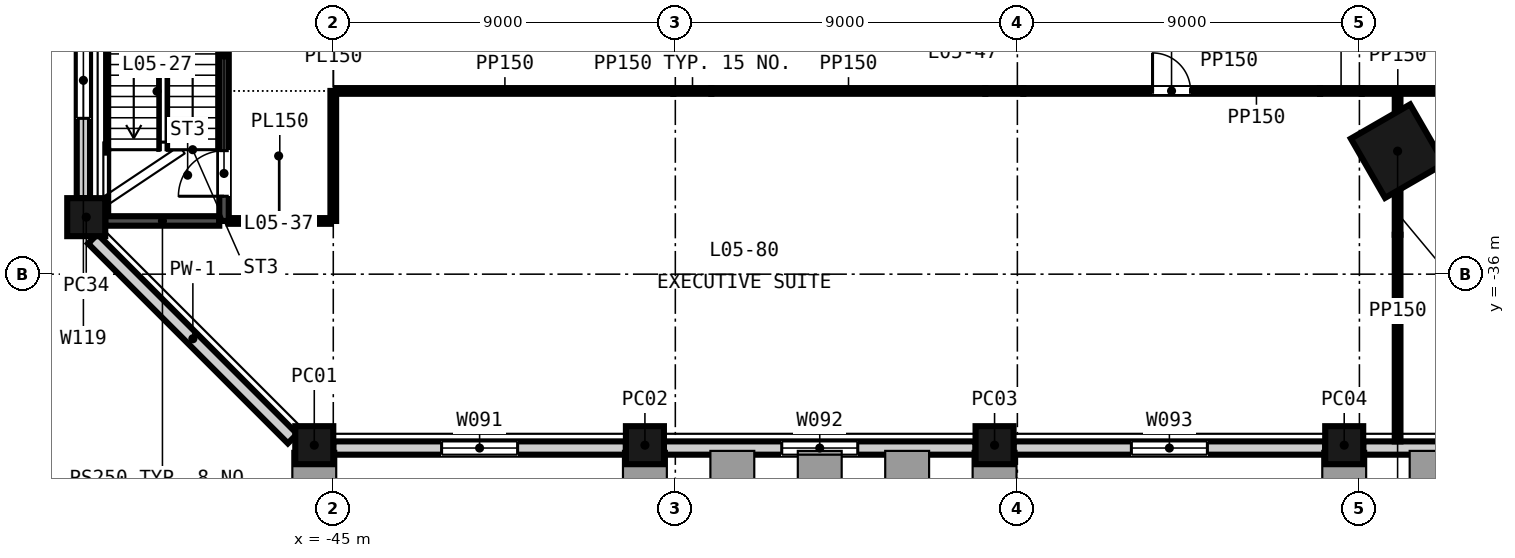
"""IFC4 building model, lengths in metres.
Left out: names, types, materials, properties, quantities, classifications, styles, units other than length and angle.
Written with IfcOpenShell. Run it as: python <this file> out.ifc"""

import sys

from ifc_helpers import new_model, si_unit, direction, frame, frame_2d, origin, origin_2d, place, context, subcontext, project, spatial, rectangle, extrude, element, fill, save


model = new_model("IFC4")
c1 = context("Model", 3, precision=1e-05, world=origin(), true_north=direction((0.0, 1.0)))
c2 = subcontext(c1, "Body", "Model", "MODEL_VIEW")
j1 = project(units=[si_unit("LENGTHUNIT", "METRE"), si_unit("PLANEANGLEUNIT", "RADIAN")], contexts=[c1])
p1 = place(None, origin())
s1 = spatial("IfcSite", under=j1, at=p1, CompositionType="ELEMENT")
p2 = place(p1, origin())
s2 = spatial("IfcBuilding", under=s1, at=p2, CompositionType="ELEMENT")
p3 = place(p2, frame((0.0, 0.0, 31.5)))
s3 = spatial("IfcBuildingStorey", under=s2, at=p3, CompositionType="ELEMENT", Elevation=31.5)
p4 = place(p3, frame((-16.995, -32.763, -0.3), z_axis=(0.0, 0.0, 1.0), x_axis=(0.5, -0.866025403784, 0.0)))
e1 = element("IfcColumn", 1, at=p4, inside=s3, PredefinedType="COLUMN", context=c2, shape_type="SweptSolid", body=[
    extrude(rectangle(XDim=1.8, YDim=1.8, at=origin_2d()), origin(), (0.0, 0.0, 1.0), 4.65),
])
for number, where, z_axis, x_axis in (
    (2, (-45.5, -40.5, -0.3), (0.0, 0.0, 1.0), (1.0, 0.0, 0.0)),
    (3, (-36.8, -40.5, -0.3), (0.0, 0.0, 1.0), (1.0, 0.0, 0.0)),
    (4, (-27.6, -40.5, -0.3), (0.0, 0.0, 1.0), (1.0, 0.0, 0.0)),
    (5, (-18.4, -40.5, -0.3), (0.0, 0.0, 1.0), (1.0, 0.0, 0.0)),
    (6, (-51.5, -34.5, -0.3), (0.0, 0.0, 1.0), (0.0, -1.0, 0.0)),
):
    element("IfcColumn", number, at=place(p3, frame(where, z_axis=z_axis, x_axis=x_axis)), inside=s3, PredefinedType="COLUMN", context=c2, shape_type="SweptSolid", body=[
        extrude(rectangle(XDim=1.0, YDim=1.0, at=origin_2d()), origin(), (0.0, 0.0, 1.0), 4.65),
    ])
p5 = place(p3, frame((-45.0, -40.575, -0.3), z_axis=(0.0, 0.0, 1.0), x_axis=(1.0, 0.0, 0.0)))
e7 = element("IfcWall", 7, at=p5, inside=s3, PredefinedType="SOLIDWALL", context=c2, shape_type="SweptSolid", body=[
    extrude(rectangle(XDim=7.7, YDim=0.35, at=frame_2d((3.85, 0.0))), origin(), (0.0, 0.0, 1.0), 3.75),
])
p6 = place(p5, frame((2.85, 0.0, 1.2)))
e8 = element("IfcOpeningElement", 8, at=p6, cuts=e7, PredefinedType="OPENING", context=c2, shape_type="SweptSolid", body=[
    extrude(rectangle(XDim=2.0, YDim=2.5, at=frame_2d((1.0, 1.25))), frame((0.0, 0.185, 0.0), z_axis=(0.0, -1.0, 0.0), x_axis=(1.0, 0.0, 0.0)), (0.0, 0.0, 1.0), 0.37),
])
p7 = place(p3, frame((-36.3, -40.575, -0.3), z_axis=(0.0, 0.0, 1.0), x_axis=(1.0, 0.0, 0.0)))
e9 = element("IfcWall", 9, at=p7, inside=s3, PredefinedType="SOLIDWALL", context=c2, shape_type="SweptSolid", body=[
    extrude(rectangle(XDim=8.2, YDim=0.35, at=frame_2d((4.1, 0.0))), origin(), (0.0, 0.0, 1.0), 3.75),
])
p8 = place(p7, frame((3.1, 0.0, 1.2)))
e10 = element("IfcOpeningElement", 10, at=p8, cuts=e9, PredefinedType="OPENING", context=c2, shape_type="SweptSolid", body=[
    extrude(rectangle(XDim=2.0, YDim=2.5, at=frame_2d((1.0, 1.25))), frame((0.0, 0.185, 0.0), z_axis=(0.0, -1.0, 0.0), x_axis=(1.0, 0.0, 0.0)), (0.0, 0.0, 1.0), 0.37),
])
p9 = place(p3, frame((-27.1, -40.575, -0.3), z_axis=(0.0, 0.0, 1.0), x_axis=(1.0, 0.0, 0.0)))
e11 = element("IfcWall", 11, at=p9, inside=s3, PredefinedType="SOLIDWALL", context=c2, shape_type="SweptSolid", body=[
    extrude(rectangle(XDim=8.2, YDim=0.35, at=frame_2d((4.1, 0.0))), origin(), (0.0, 0.0, 1.0), 3.75),
])
p10 = place(p9, frame((3.1, 0.0, 1.2)))
e12 = element("IfcOpeningElement", 12, at=p10, cuts=e11, PredefinedType="OPENING", context=c2, shape_type="SweptSolid", body=[
    extrude(rectangle(XDim=2.0, YDim=2.5, at=frame_2d((1.0, 1.25))), frame((0.0, 0.185, 0.0), z_axis=(0.0, -1.0, 0.0), x_axis=(1.0, 0.0, 0.0)), (0.0, 0.0, 1.0), 0.37),
])
p11 = place(p3, frame((-17.9, -40.575, -0.3), z_axis=(0.0, 0.0, 1.0), x_axis=(1.0, 0.0, 0.0)))
e13 = element("IfcWall", 13, at=p11, inside=s3, PredefinedType="SOLIDWALL", context=c2, shape_type="SweptSolid", body=[
    extrude(rectangle(XDim=8.2, YDim=0.35, at=frame_2d((4.1, 0.0))), origin(), (0.0, 0.0, 1.0), 3.75),
])
p12 = place(p11, frame((3.1, 0.0, 1.2)))
e14 = element("IfcOpeningElement", 14, at=p12, cuts=e13, PredefinedType="OPENING", context=c2, shape_type="SweptSolid", body=[
    extrude(rectangle(XDim=2.0, YDim=2.5, at=frame_2d((1.0, 1.25))), frame((0.0, 0.185, 0.0), z_axis=(0.0, -1.0, 0.0), x_axis=(1.0, 0.0, 0.0)), (0.0, 0.0, 1.0), 0.37),
])
p13 = place(p3, frame((-51.575, -27.8, -0.3), z_axis=(0.0, 0.0, 1.0), x_axis=(0.0, -1.0, 0.0)))
e15 = element("IfcWall", 15, at=p13, inside=s3, PredefinedType="SOLIDWALL", context=c2, shape_type="SweptSolid", body=[
    extrude(rectangle(XDim=6.2, YDim=0.35, at=frame_2d((3.1, 0.0))), origin(), (0.0, 0.0, 1.0), 3.75),
])
p14 = place(p13, frame((2.1, 0.0, 1.2)))
e16 = element("IfcOpeningElement", 16, at=p14, cuts=e15, PredefinedType="OPENING", context=c2, shape_type="SweptSolid", body=[
    extrude(rectangle(XDim=2.0, YDim=2.5, at=frame_2d((1.0, 1.25))), frame((0.0, 0.185, 0.0), z_axis=(0.0, -1.0, 0.0), x_axis=(1.0, 0.0, 0.0)), (0.0, 0.0, 1.0), 0.37),
])
p15 = place(p3, frame((-51.327, -35.072, -0.3), z_axis=(0.0, 0.0, 1.0), x_axis=(0.707106781187, -0.707106781187, 0.0)))
e17 = element("IfcWall", 17, at=p15, inside=s3, PredefinedType="SOLIDWALL", context=c2, shape_type="SweptSolid", body=[
    extrude(rectangle(XDim=7.433, YDim=0.35, at=frame_2d((3.716, 0.0))), origin(), (0.0, 0.0, 1.0), 3.75),
])
p16 = place(p3, frame((-51.0, -34.6, 0.0), z_axis=(0.0, 0.0, 1.0), x_axis=(1.0, 0.0, 0.0)))
e18 = element("IfcWall", 18, at=p16, inside=s3, PredefinedType="SHEAR", context=c2, shape_type="SweptSolid", body=[
    extrude(rectangle(XDim=3.0, YDim=0.25, at=frame_2d((1.5, 0.0))), origin(), (0.0, 0.0, 1.0), 4.35),
])
p17 = place(p3, frame((-47.75, -34.6, 0.0), z_axis=(0.0, 0.0, 1.0), x_axis=(1.0, 0.0, 0.0)))
e19 = element("IfcWall", 19, at=p17, inside=s3, PredefinedType="PARTITIONING", context=c2, shape_type="SweptSolid", body=[
    extrude(rectangle(XDim=2.675, YDim=0.15, at=frame_2d((1.337, 0.0))), origin(), (0.0, 0.0, 1.0), 4.35),
])
p18 = place(p3, frame((-44.925, -31.179, 0.0), z_axis=(0.0, 0.0, 1.0), x_axis=(1.0, 0.0, 0.0)))
e20 = element("IfcWall", 20, at=p18, inside=s3, PredefinedType="PARTITIONING", context=c2, shape_type="SweptSolid", body=[
    extrude(rectangle(XDim=8.872, YDim=0.15, at=frame_2d((4.436, 0.0))), origin(), (0.0, 0.0, 1.0), 4.35),
])
p19 = place(p3, frame((-36.053, -31.179, 0.0), z_axis=(0.0, 0.0, 1.0), x_axis=(1.0, 0.0, 0.0)))
e21 = element("IfcWall", 21, at=p19, inside=s3, PredefinedType="PARTITIONING", context=c2, shape_type="SweptSolid", body=[
    extrude(rectangle(XDim=1.0, YDim=0.15, at=frame_2d((0.5, 0.0))), origin(), (0.0, 0.0, 1.0), 3.261),
])
p20 = place(p3, frame((-35.053, -31.179, 0.0), z_axis=(0.0, 0.0, 1.0), x_axis=(1.0, 0.0, 0.0)))
e22 = element("IfcWall", 22, at=p20, inside=s3, PredefinedType="PARTITIONING", context=c2, shape_type="SweptSolid", body=[
    extrude(rectangle(XDim=7.209, YDim=0.15, at=frame_2d((3.605, 0.0))), origin(), (0.0, 0.0, 1.0), 4.35),
])
p21 = place(p3, frame((-27.843, -31.179, 0.0), z_axis=(0.0, 0.0, 1.0), x_axis=(1.0, 0.0, 0.0)))
e23 = element("IfcWall", 23, at=p21, inside=s3, PredefinedType="PARTITIONING", context=c2, shape_type="SweptSolid", body=[
    extrude(rectangle(XDim=1.0, YDim=0.15, at=frame_2d((0.5, 0.0))), origin(), (0.0, 0.0, 1.0), 3.436),
])
p22 = place(p3, frame((-26.843, -31.179, 0.0), z_axis=(0.0, 0.0, 1.0), x_axis=(1.0, 0.0, 0.0)))
e24 = element("IfcWall", 24, at=p22, inside=s3, PredefinedType="PARTITIONING", context=c2, shape_type="SweptSolid", body=[
    extrude(rectangle(XDim=7.807, YDim=0.15, at=frame_2d((3.904, 0.0))), origin(), (0.0, 0.0, 1.0), 4.35),
])
p23 = place(p22, frame((3.4, 0.0, 0.0)))
e25 = element("IfcOpeningElement", 25, at=p23, cuts=e24, PredefinedType="OPENING", context=c2, shape_type="SweptSolid", body=[
    extrude(rectangle(XDim=1.0, YDim=2.1, at=frame_2d((0.5, 1.05))), frame((0.0, 0.085, 0.0), z_axis=(0.0, -1.0, 0.0), x_axis=(1.0, 0.0, 0.0)), (0.0, 0.0, 1.0), 0.17),
])
p24 = place(p3, frame((-19.036, -31.179, 0.0), z_axis=(0.0, 0.0, 1.0), x_axis=(1.0, 0.0, 0.0)))
e26 = element("IfcWall", 26, at=p24, inside=s3, PredefinedType="PARTITIONING", context=c2, shape_type="SweptSolid", body=[
    extrude(rectangle(XDim=1.097, YDim=0.15, at=frame_2d((0.548, 0.0))), origin(), (0.0, 0.0, 1.0), 3.5),
])
p25 = place(p3, frame((-17.939, -31.179, 0.0), z_axis=(0.0, 0.0, 1.0), x_axis=(1.0, 0.0, 0.0)))
e27 = element("IfcWall", 27, at=p25, inside=s3, PredefinedType="PARTITIONING", context=c2, shape_type="SweptSolid", body=[
    extrude(rectangle(XDim=17.593, YDim=0.15, at=frame_2d((8.796, 0.0))), origin(), (0.0, 0.0, 1.0), 4.35),
])
p26 = place(p25, frame((2.094, 0.0, 0.0)))
e28 = element("IfcOpeningElement", 28, at=p26, cuts=e27, PredefinedType="OPENING", context=c2, shape_type="SweptSolid", body=[
    extrude(rectangle(XDim=1.0, YDim=2.1, at=frame_2d((0.5, 1.05))), frame((0.0, 0.085, 0.0), z_axis=(0.0, -1.0, 0.0), x_axis=(1.0, 0.0, 0.0)), (0.0, 0.0, 1.0), 0.17),
])
p27 = place(p25, frame((5.957, 0.0, 0.0)))
e29 = element("IfcOpeningElement", 29, at=p27, cuts=e27, PredefinedType="OPENING", context=c2, shape_type="SweptSolid", body=[
    extrude(rectangle(XDim=1.0, YDim=2.1, at=frame_2d((0.5, 1.05))), frame((0.0, 0.085, 0.0), z_axis=(0.0, -1.0, 0.0), x_axis=(1.0, 0.0, 0.0)), (0.0, 0.0, 1.0), 0.17),
])
p28 = place(p25, frame((13.978, 0.0, 0.0)))
e30 = element("IfcOpeningElement", 30, at=p28, cuts=e27, PredefinedType="OPENING", context=c2, shape_type="SweptSolid", body=[
    extrude(rectangle(XDim=1.0, YDim=2.1, at=frame_2d((0.5, 1.05))), frame((0.0, 0.085, 0.0), z_axis=(0.0, -1.0, 0.0), x_axis=(1.0, 0.0, 0.0)), (0.0, 0.0, 1.0), 0.17),
])
p29 = place(p3, frame((-47.875, -34.6, 0.0), z_axis=(0.0, 0.0, 1.0), x_axis=(0.0, 1.0, 0.0)))
e31 = element("IfcWall", 31, at=p29, inside=s3, PredefinedType="SHEAR", context=c2, shape_type="SweptSolid", body=[
    extrude(rectangle(XDim=6.821, YDim=0.25, at=frame_2d((3.411, 0.0))), origin(), (0.0, 0.0, 1.0), 4.35),
])
p30 = place(p29, frame((0.65, 0.0, 0.0)))
e32 = element("IfcOpeningElement", 32, at=p30, cuts=e31, PredefinedType="OPENING", context=c2, shape_type="SweptSolid", body=[
    extrude(rectangle(XDim=1.2, YDim=2.1, at=frame_2d((0.6, 1.05))), frame((0.0, 0.135, 0.0), z_axis=(0.0, -1.0, 0.0), x_axis=(1.0, 0.0, 0.0)), (0.0, 0.0, 1.0), 0.27),
])
p31 = place(p3, frame((-45.0, -34.6, 0.0), z_axis=(0.0, 0.0, 1.0), x_axis=(0.0, 1.0, 0.0)))
e33 = element("IfcWall", 33, at=p31, inside=s3, PredefinedType="PARTITIONING", context=c2, shape_type="SweptSolid", body=[
    extrude(rectangle(XDim=3.421, YDim=0.15, at=frame_2d((1.71, 0.0))), origin(), (0.0, 0.0, 1.0), 4.35),
])
p32 = place(p3, frame((-16.995, -40.4, 0.0), z_axis=(0.0, 0.0, 1.0), x_axis=(0.0, 1.0, 0.0)))
e34 = element("IfcWall", 34, at=p32, inside=s3, PredefinedType="PARTITIONING", context=c2, shape_type="SweptSolid", body=[
    extrude(rectangle(XDim=5.438, YDim=0.15, at=frame_2d((2.719, 0.0))), origin(), (0.0, 0.0, 1.0), 4.35),
])
p33 = place(p3, frame((-16.995, -34.962, 0.0), z_axis=(0.0, 0.0, 1.0), x_axis=(0.0, 1.0, 0.0)))
e35 = element("IfcWall", 35, at=p33, inside=s3, PredefinedType="PARTITIONING", context=c2, shape_type="SweptSolid", body=[
    extrude(rectangle(XDim=1.117, YDim=0.15, at=frame_2d((0.558, 0.0))), origin(), (0.0, 0.0, 1.0), 3.826),
])
p34 = place(p3, frame((-16.995, -31.681, 0.0), z_axis=(0.0, 0.0, 1.0), x_axis=(0.0, 1.0, 0.0)))
e36 = element("IfcWall", 36, at=p34, inside=s3, PredefinedType="PARTITIONING", context=c2, shape_type="SweptSolid", body=[
    extrude(rectangle(XDim=0.427, YDim=0.15, at=frame_2d((0.213, 0.0))), origin(), (0.0, 0.0, 1.0), 4.35),
])
p35 = place(p6, origin())
e37 = element("IfcWindow", 37, at=p35, inside=s3, PartitioningType="SINGLE_PANEL", PredefinedType="WINDOW", context=c2, shape_type="SweptSolid", body=[
    extrude(rectangle(XDim=2.0, YDim=2.5, at=frame_2d((1.0, 1.25))), frame((0.0, 0.03, 0.0), z_axis=(0.0, -1.0, 0.0), x_axis=(1.0, 0.0, 0.0)), (0.0, 0.0, 1.0), 0.06),
])
fill(e8, e37)
p36 = place(p8, origin())
e38 = element("IfcWindow", 38, at=p36, inside=s3, PartitioningType="SINGLE_PANEL", PredefinedType="WINDOW", context=c2, shape_type="SweptSolid", body=[
    extrude(rectangle(XDim=2.0, YDim=2.5, at=frame_2d((1.0, 1.25))), frame((0.0, 0.03, 0.0), z_axis=(0.0, -1.0, 0.0), x_axis=(1.0, 0.0, 0.0)), (0.0, 0.0, 1.0), 0.06),
])
fill(e10, e38)
p37 = place(p10, origin())
e39 = element("IfcWindow", 39, at=p37, inside=s3, PartitioningType="SINGLE_PANEL", PredefinedType="WINDOW", context=c2, shape_type="SweptSolid", body=[
    extrude(rectangle(XDim=2.0, YDim=2.5, at=frame_2d((1.0, 1.25))), frame((0.0, 0.03, 0.0), z_axis=(0.0, -1.0, 0.0), x_axis=(1.0, 0.0, 0.0)), (0.0, 0.0, 1.0), 0.06),
])
fill(e12, e39)
p38 = place(p14, origin())
e40 = element("IfcWindow", 40, at=p38, inside=s3, PartitioningType="SINGLE_PANEL", PredefinedType="WINDOW", context=c2, shape_type="SweptSolid", body=[
    extrude(rectangle(XDim=2.0, YDim=2.5, at=frame_2d((1.0, 1.25))), frame((0.0, 0.03, 0.0), z_axis=(0.0, -1.0, 0.0), x_axis=(1.0, 0.0, 0.0)), (0.0, 0.0, 1.0), 0.06),
])
fill(e16, e40)
p39 = place(p30, origin())
e41 = element("IfcDoor", 41, at=p39, inside=s3, OperationType="SINGLE_SWING_LEFT", PredefinedType="DOOR", context=c2, shape_type="SweptSolid", body=[
    extrude(rectangle(XDim=1.2, YDim=2.1, at=frame_2d((0.6, 1.05))), frame((0.0, 0.025, 0.0), z_axis=(0.0, -1.0, 0.0), x_axis=(1.0, 0.0, 0.0)), (0.0, 0.0, 1.0), 0.05),
])
fill(e32, e41)
p40 = place(p23, origin())
e42 = element("IfcDoor", 42, at=p40, inside=s3, OperationType="SINGLE_SWING_LEFT", PredefinedType="DOOR", context=c2, shape_type="SweptSolid", body=[
    extrude(rectangle(XDim=1.0, YDim=2.1, at=frame_2d((0.5, 1.05))), frame((0.0, 0.025, 0.0), z_axis=(0.0, -1.0, 0.0), x_axis=(1.0, 0.0, 0.0)), (0.0, 0.0, 1.0), 0.05),
])
fill(e25, e42)
save(model, sys.argv[1])
